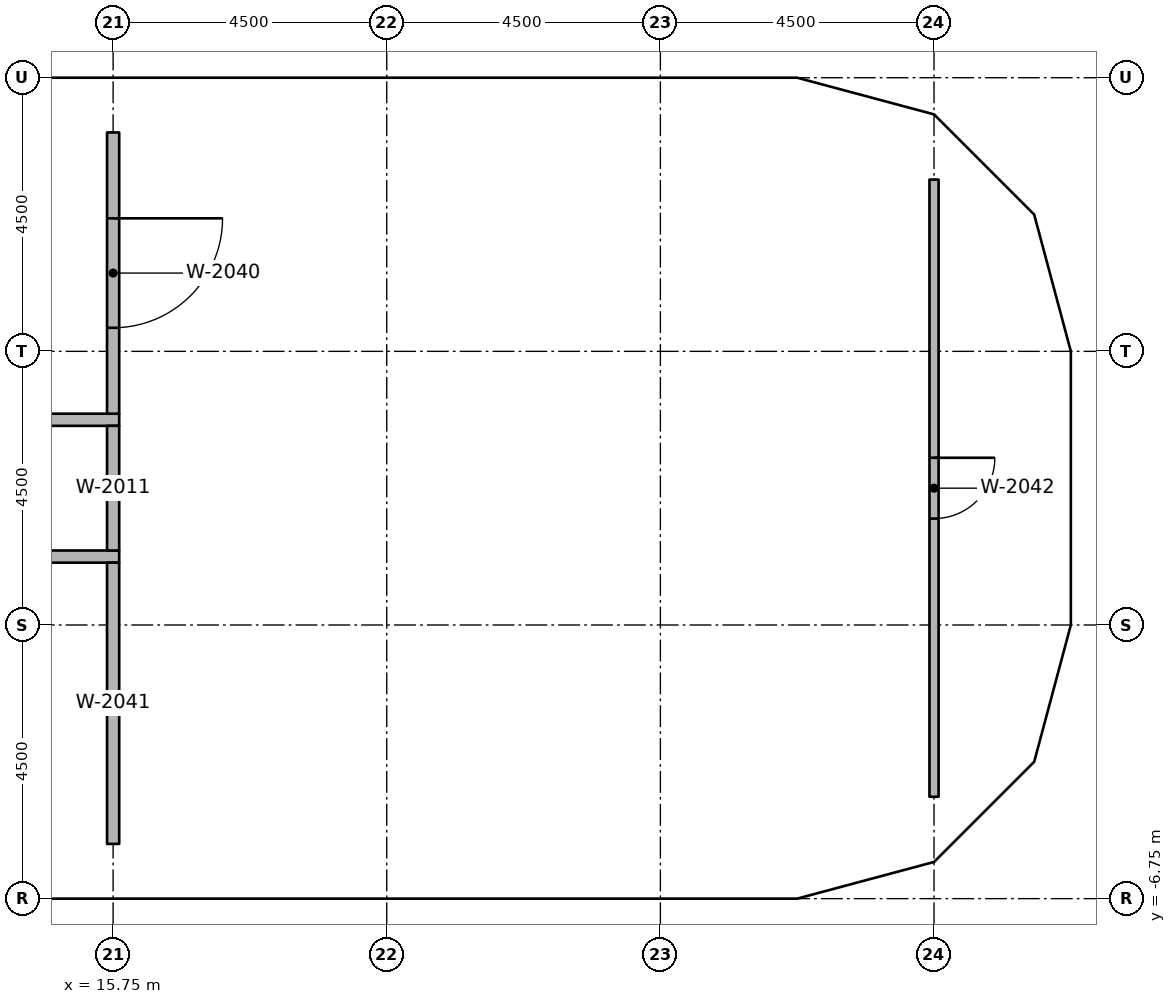
"""IFC4 building model, lengths in metres.
Left out: names, types, materials, properties, quantities, classifications, styles, units other than length and angle.
Written with IfcOpenShell. Run it as: python <this file> out.ifc"""

import sys

from ifc_helpers import new_model, si_unit, direction, frame, frame_2d, origin, origin_2d, place, context, subcontext, project, spatial, rectangle, extrude, element, fill, save


model = new_model("IFC4")
c1 = context("Model", 3, precision=1e-05, world=origin(), true_north=direction((0.0, 1.0)))
c2 = subcontext(c1, "Body", "Model", "MODEL_VIEW")
j1 = project(units=[si_unit("LENGTHUNIT", "METRE"), si_unit("PLANEANGLEUNIT", "RADIAN")], contexts=[c1])
p1 = place(None, origin())
s1 = spatial("IfcSite", under=j1, at=p1, CompositionType="ELEMENT")
p2 = place(p1, origin())
s2 = spatial("IfcBuilding", under=s1, at=p2, CompositionType="ELEMENT")
p3 = place(p2, frame((0.0, 0.0, 186.6)))
s3 = spatial("IfcBuildingStorey", under=s2, at=p3, CompositionType="ELEMENT", Elevation=186.6)
for number, where, z_axis, x_axis in (
    (1, (15.75, -6.25, 0.0), (0.0, 0.0, 1.0), (1.0, 0.0, 0.0)),
    (2, (15.75, 6.25, 0.0), (0.0, 0.0, 1.0), (1.0, 0.0, 0.0)),
    (3, (20.25, -6.11, 0.0), (0.0, 0.0, 1.0), (1.0, 0.0, 0.0)),
    (4, (20.25, 6.11, 0.0), (0.0, 0.0, 1.0), (1.0, 0.0, 0.0)),
    (5, (24.75, -6.11, 0.0), (0.0, 0.0, 1.0), (1.0, 0.0, 0.0)),
    (6, (24.75, 6.11, 0.0), (0.0, 0.0, 1.0), (1.0, 0.0, 0.0)),
    (7, (28.908, -5.475, 0.0), (0.0, 0.0, 1.0), (1.0, 0.0, 0.0)),
    (8, (28.67, -2.25, 0.0), (0.0, 0.0, 1.0), (1.0, 0.0, 0.0)),
    (9, (28.67, 2.25, 0.0), (0.0, 0.0, 1.0), (1.0, 0.0, 0.0)),
    (10, (28.908, 5.475, 0.0), (0.0, 0.0, 1.0), (1.0, 0.0, 0.0)),
):
    element("IfcColumn", number, at=place(p3, frame(where, z_axis=z_axis, x_axis=x_axis)), inside=s3, PredefinedType="COLUMN", context=c2, shape_type="SweptSolid", body=[
        extrude(rectangle(XDim=0.8, YDim=0.8, at=origin_2d()), origin(), (0.0, 0.0, 1.0), 3.65),
    ])
p4 = place(p3, frame((11.15, 1.125, 0.0), z_axis=(0.0, 0.0, 1.0), x_axis=(1.0, 0.0, 0.0)))
e11 = element("IfcWall", 11, at=p4, inside=s3, PredefinedType="PARTITIONING", context=c2, shape_type="SweptSolid", body=[
    extrude(rectangle(XDim=4.7, YDim=0.2, at=frame_2d((2.35, 0.0))), origin(), (0.0, 0.0, 1.0), 2.746),
])
p5 = place(p4, frame((1.85, 0.0, 0.0)))
e12 = element("IfcOpeningElement", 12, at=p5, cuts=e11, PredefinedType="OPENING", context=c2, shape_type="SweptSolid", body=[
    extrude(rectangle(XDim=1.0, YDim=2.1, at=frame_2d((0.5, 1.05))), frame((0.0, 0.11, 0.0), z_axis=(0.0, -1.0, 0.0), x_axis=(1.0, 0.0, 0.0)), (0.0, 0.0, 1.0), 0.22),
])
p6 = place(p3, frame((15.85, -1.125, 0.0), z_axis=(0.0, 0.0, 1.0), x_axis=(-1.0, 0.0, 0.0)))
e13 = element("IfcWall", 13, at=p6, inside=s3, PredefinedType="PARTITIONING", context=c2, shape_type="SweptSolid", body=[
    extrude(rectangle(XDim=4.7, YDim=0.2, at=frame_2d((2.35, 0.0))), origin(), (0.0, 0.0, 1.0), 2.746),
])
p7 = place(p6, frame((1.85, 0.0, 0.0)))
e14 = element("IfcOpeningElement", 14, at=p7, cuts=e13, PredefinedType="OPENING", context=c2, shape_type="SweptSolid", body=[
    extrude(rectangle(XDim=1.0, YDim=2.1, at=frame_2d((0.5, 1.05))), frame((0.0, 0.11, 0.0), z_axis=(0.0, -1.0, 0.0), x_axis=(1.0, 0.0, 0.0)), (0.0, 0.0, 1.0), 0.22),
])
p8 = place(p3, frame((15.75, -1.025, 0.0), z_axis=(0.0, 0.0, 1.0), x_axis=(0.0, 1.0, 0.0)))
e15 = element("IfcWall", 15, at=p8, inside=s3, PredefinedType="PARTITIONING", context=c2, shape_type="SweptSolid", body=[
    extrude(rectangle(XDim=2.05, YDim=0.2, at=frame_2d((1.025, 0.0))), origin(), (0.0, 0.0, 1.0), 2.746),
])
p9 = place(p3, frame((15.75, 5.85, 0.0), z_axis=(0.0, 0.0, 1.0), x_axis=(0.0, -1.0, 0.0)))
e16 = element("IfcWall", 16, at=p9, inside=s3, PredefinedType="PARTITIONING", context=c2, shape_type="SweptSolid", body=[
    extrude(rectangle(XDim=4.625, YDim=0.2, at=frame_2d((2.312, 0.0))), origin(), (0.0, 0.0, 1.0), 2.746),
])
p10 = place(p9, frame((1.413, 0.0, 0.0)))
e17 = element("IfcOpeningElement", 17, at=p10, cuts=e16, PredefinedType="OPENING", context=c2, shape_type="SweptSolid", body=[
    extrude(rectangle(XDim=1.8, YDim=2.1, at=frame_2d((0.9, 1.05))), frame((0.0, 0.11, 0.0), z_axis=(0.0, -1.0, 0.0), x_axis=(1.0, 0.0, 0.0)), (0.0, 0.0, 1.0), 0.22),
])
p11 = place(p3, frame((15.75, -5.85, 0.0), z_axis=(0.0, 0.0, 1.0), x_axis=(0.0, 1.0, 0.0)))
e18 = element("IfcWall", 18, at=p11, inside=s3, PredefinedType="PARTITIONING", context=c2, shape_type="SweptSolid", body=[
    extrude(rectangle(XDim=4.625, YDim=0.2, at=frame_2d((2.312, 0.0))), origin(), (0.0, 0.0, 1.0), 2.746),
])
p12 = place(p3, frame((29.25, 5.075, 0.0), z_axis=(0.0, 0.0, 1.0), x_axis=(0.0, -1.0, 0.0)))
e19 = element("IfcWall", 19, at=p12, inside=s3, PredefinedType="PARTITIONING", context=c2, shape_type="SweptSolid", body=[
    extrude(rectangle(XDim=10.15, YDim=0.15, at=frame_2d((5.075, 0.0))), origin(), (0.0, 0.0, 1.0), 2.746),
])
p13 = place(p12, frame((4.575, 0.0, 0.0)))
e20 = element("IfcOpeningElement", 20, at=p13, cuts=e19, PredefinedType="OPENING", context=c2, shape_type="SweptSolid", body=[
    extrude(rectangle(XDim=1.0, YDim=2.1, at=frame_2d((0.5, 1.05))), frame((0.0, 0.085, 0.0), z_axis=(0.0, -1.0, 0.0), x_axis=(1.0, 0.0, 0.0)), (0.0, 0.0, 1.0), 0.17),
])
p14 = place(p13, origin())
e21 = element("IfcDoor", 21, at=p14, inside=s3, OperationType="SINGLE_SWING_RIGHT", PredefinedType="DOOR", context=c2, shape_type="SweptSolid", body=[
    extrude(rectangle(XDim=1.0, YDim=2.1, at=frame_2d((0.5, 1.05))), frame((0.0, 0.025, 0.0), z_axis=(0.0, -1.0, 0.0), x_axis=(1.0, 0.0, 0.0)), (0.0, 0.0, 1.0), 0.05),
])
fill(e20, e21)
p15 = place(p10, origin())
e22 = element("IfcDoor", 22, at=p15, inside=s3, OperationType="DOUBLE_DOOR_SINGLE_SWING", PredefinedType="DOOR", context=c2, shape_type="SweptSolid", body=[
    extrude(rectangle(XDim=1.8, YDim=2.1, at=frame_2d((0.9, 1.05))), frame((0.0, 0.025, 0.0), z_axis=(0.0, -1.0, 0.0), x_axis=(1.0, 0.0, 0.0)), (0.0, 0.0, 1.0), 0.05),
])
fill(e17, e22)
save(model, sys.argv[1])
